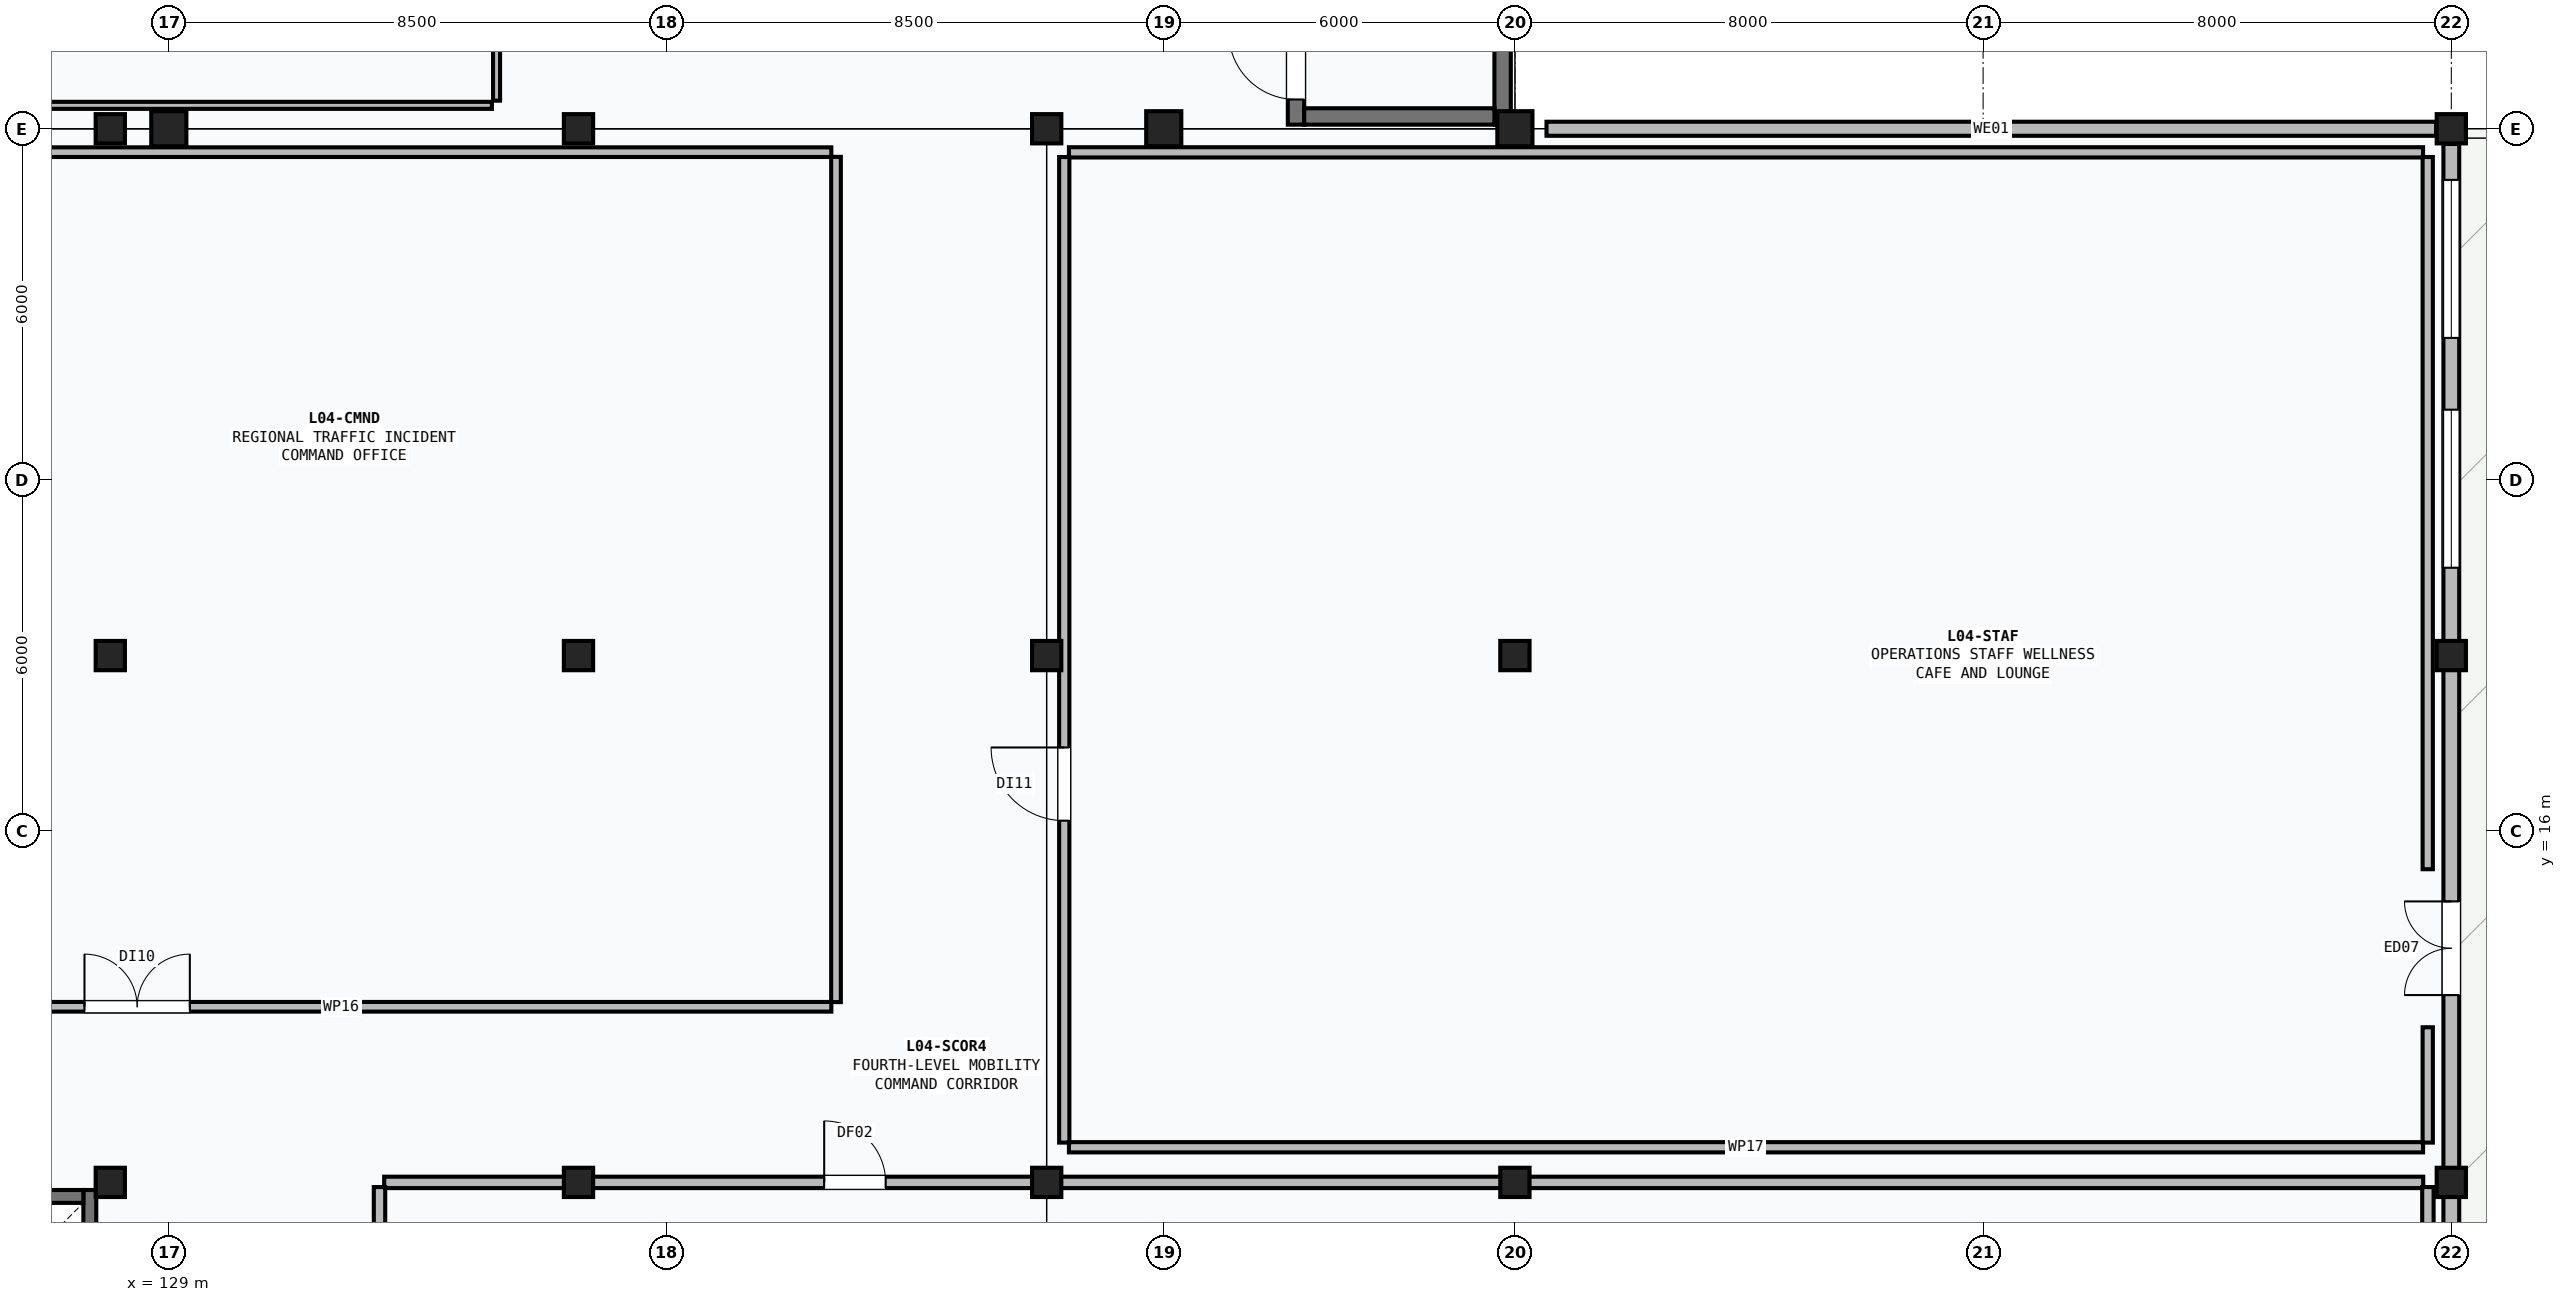
"""IFC4 building model, lengths in metres.
Left out: names, types, materials, properties, quantities, classifications, styles, units other than length and angle.
Written with IfcOpenShell. Run it as: python <this file> out.ifc"""

import sys

from ifc_helpers import new_model, si_unit, direction, frame, frame_2d, origin, origin_2d, place, context, subcontext, project, spatial, rectangle, extrude, element, fill, save


model = new_model("IFC4")
c1 = context("Model", 3, precision=1e-05, world=origin(), true_north=direction((0.0, 1.0)))
c2 = subcontext(c1, "Body", "Model", "MODEL_VIEW")
j1 = project(units=[si_unit("LENGTHUNIT", "METRE"), si_unit("PLANEANGLEUNIT", "RADIAN")], contexts=[c1])
p1 = place(None, origin())
s1 = spatial("IfcSite", under=j1, at=p1, CompositionType="ELEMENT")
p2 = place(p1, origin())
s2 = spatial("IfcBuilding", under=s1, at=p2, CompositionType="ELEMENT")
p3 = place(p2, frame((0.0, 0.0, 15.6)))
s3 = spatial("IfcBuildingStorey", under=s2, at=p3, CompositionType="ELEMENT", Elevation=15.6)
for number, where, z_axis, x_axis in (
    (1, (129.0, 28.0, 0.0), (0.0, 0.0, 1.0), (1.0, 0.0, 0.0)),
    (2, (146.0, 28.0, 0.0), (0.0, 0.0, 1.0), (1.0, 0.0, 0.0)),
    (3, (152.0, 28.0, 0.0), (0.0, 0.0, 1.0), (1.0, 0.0, 0.0)),
):
    element("IfcColumn", number, at=place(p3, frame(where, z_axis=z_axis, x_axis=x_axis)), inside=s3, PredefinedType="COLUMN", context=c2, shape_type="SweptSolid", body=[
        extrude(rectangle(XDim=0.6, YDim=0.6, at=origin_2d()), origin(), (0.0, 0.0, 1.0), 3.6),
    ])
for number, where, z_axis, x_axis in (
    (4, (128.0, 10.0, 0.0), (0.0, 0.0, 1.0), (1.0, 0.0, 0.0)),
    (5, (128.0, 19.0, 0.0), (0.0, 0.0, 1.0), (1.0, 0.0, 0.0)),
    (6, (128.0, 28.0, 0.0), (0.0, 0.0, 1.0), (1.0, 0.0, 0.0)),
    (7, (136.0, 10.0, 0.0), (0.0, 0.0, 1.0), (1.0, 0.0, 0.0)),
    (8, (136.0, 19.0, 0.0), (0.0, 0.0, 1.0), (1.0, 0.0, 0.0)),
    (9, (136.0, 28.0, 0.0), (0.0, 0.0, 1.0), (1.0, 0.0, 0.0)),
    (10, (144.0, 10.0, 0.0), (0.0, 0.0, 1.0), (1.0, 0.0, 0.0)),
    (11, (144.0, 19.0, 0.0), (0.0, 0.0, 1.0), (1.0, 0.0, 0.0)),
    (12, (144.0, 28.0, 0.0), (0.0, 0.0, 1.0), (1.0, 0.0, 0.0)),
    (13, (152.0, 10.0, 0.0), (0.0, 0.0, 1.0), (1.0, 0.0, 0.0)),
    (14, (152.0, 19.0, 0.0), (0.0, 0.0, 1.0), (1.0, 0.0, 0.0)),
    (15, (168.0, 10.0, 0.0), (0.0, 0.0, 1.0), (1.0, 0.0, 0.0)),
    (16, (168.0, 19.0, 0.0), (0.0, 0.0, 1.0), (1.0, 0.0, 0.0)),
    (17, (168.0, 28.0, 0.0), (0.0, 0.0, 1.0), (1.0, 0.0, 0.0)),
):
    element("IfcColumn", number, at=place(p3, frame(where, z_axis=z_axis, x_axis=x_axis)), inside=s3, PredefinedType="COLUMN", context=c2, shape_type="SweptSolid", body=[
        extrude(rectangle(XDim=0.5, YDim=0.5, at=origin_2d()), origin(), (0.0, 0.0, 1.0), 3.6),
    ])
p4 = place(p3, frame((168.0, 0.26, 0.0), z_axis=(0.0, 0.0, 1.0), x_axis=(0.0, 1.0, 0.0)))
e18 = element("IfcWall", 18, at=p4, inside=s3, PredefinedType="SOLIDWALL", context=c2, shape_type="SweptSolid", body=[
    extrude(rectangle(XDim=27.48, YDim=0.27, at=frame_2d((13.74, 0.0))), origin(), (0.0, 0.0, 1.0), 2.495),
])
p5 = place(p4, frame((12.94, 0.0, 0.0)))
e19 = element("IfcOpeningElement", 19, at=p5, cuts=e18, PredefinedType="OPENING", context=c2, shape_type="SweptSolid", body=[
    extrude(rectangle(XDim=1.6, YDim=2.1, at=frame_2d((0.8, 1.05))), frame((0.0, 0.145, 0.0), z_axis=(0.0, -1.0, 0.0), x_axis=(1.0, 0.0, 0.0)), (0.0, 0.0, 1.0), 0.29),
])
p6 = place(p4, frame((0.613, 0.0, 0.495)))
e20 = element("IfcOpeningElement", 20, at=p6, cuts=e18, PredefinedType="OPENING", context=c2, shape_type="SweptSolid", body=[
    extrude(rectangle(XDim=2.7, YDim=1.8, at=frame_2d((1.35, 0.9))), frame((0.0, 0.145, 0.0), z_axis=(0.0, -1.0, 0.0), x_axis=(1.0, 0.0, 0.0)), (0.0, 0.0, 1.0), 0.29),
])
p7 = place(p4, frame((4.539, 0.0, 0.495)))
e21 = element("IfcOpeningElement", 21, at=p7, cuts=e18, PredefinedType="OPENING", context=c2, shape_type="SweptSolid", body=[
    extrude(rectangle(XDim=2.7, YDim=1.8, at=frame_2d((1.35, 0.9))), frame((0.0, 0.145, 0.0), z_axis=(0.0, -1.0, 0.0), x_axis=(1.0, 0.0, 0.0)), (0.0, 0.0, 1.0), 0.29),
])
p8 = place(p4, frame((20.241, 0.0, 0.495)))
e22 = element("IfcOpeningElement", 22, at=p8, cuts=e18, PredefinedType="OPENING", context=c2, shape_type="SweptSolid", body=[
    extrude(rectangle(XDim=2.7, YDim=1.8, at=frame_2d((1.35, 0.9))), frame((0.0, 0.145, 0.0), z_axis=(0.0, -1.0, 0.0), x_axis=(1.0, 0.0, 0.0)), (0.0, 0.0, 1.0), 0.29),
])
p9 = place(p4, frame((24.167, 0.0, 0.495)))
e23 = element("IfcOpeningElement", 23, at=p9, cuts=e18, PredefinedType="OPENING", context=c2, shape_type="SweptSolid", body=[
    extrude(rectangle(XDim=2.7, YDim=1.8, at=frame_2d((1.35, 0.9))), frame((0.0, 0.145, 0.0), z_axis=(0.0, -1.0, 0.0), x_axis=(1.0, 0.0, 0.0)), (0.0, 0.0, 1.0), 0.29),
])
p10 = place(p3, frame((167.74, 28.0, 1.2), z_axis=(0.0, 0.0, 1.0), x_axis=(-1.0, 0.0, 0.0)))
e24 = element("IfcWall", 24, at=p10, inside=s3, PredefinedType="SOLIDWALL", context=c2, shape_type="SweptSolid", body=[
    extrude(rectangle(XDim=15.2, YDim=0.24, at=frame_2d((7.6, 0.0))), origin(), (0.0, 0.0, 1.0), 1.295),
])
p11 = place(p3, frame((148.26, 28.07, 0.0), z_axis=(0.0, 0.0, 1.0), x_axis=(0.0, 1.0, 0.0)))
e25 = element("IfcWall", 25, at=p11, inside=s3, PredefinedType="SHEAR", context=c2, shape_type="SweptSolid", body=[
    extrude(rectangle(XDim=9.86, YDim=0.28, at=frame_2d((4.93, 0.0))), origin(), (0.0, 0.0, 1.0), 3.6),
])
p12 = place(p11, frame((0.43, 0.0, 0.0)))
e26 = element("IfcOpeningElement", 26, at=p12, cuts=e25, PredefinedType="OPENING", context=c2, shape_type="SweptSolid", body=[
    extrude(rectangle(XDim=1.15, YDim=2.15, at=frame_2d((0.575, 1.075))), frame((0.0, 0.15, 0.0), z_axis=(0.0, -1.0, 0.0), x_axis=(1.0, 0.0, 0.0)), (0.0, 0.0, 1.0), 0.3),
])
p13 = place(p3, frame((151.79, 37.93, 0.0), z_axis=(0.0, 0.0, 1.0), x_axis=(0.0, -1.0, 0.0)))
e27 = element("IfcWall", 27, at=p13, inside=s3, PredefinedType="SHEAR", context=c2, shape_type="SweptSolid", body=[
    extrude(rectangle(XDim=9.86, YDim=0.28, at=frame_2d((4.93, 0.0))), origin(), (0.0, 0.0, 1.0), 3.6),
])
p14 = place(p3, frame((151.65, 28.21, 0.0), z_axis=(0.0, 0.0, 1.0), x_axis=(-1.0, 0.0, 0.0)))
e28 = element("IfcWall", 28, at=p14, inside=s3, PredefinedType="SHEAR", context=c2, shape_type="SweptSolid", body=[
    extrude(rectangle(XDim=3.25, YDim=0.28, at=frame_2d((1.625, 0.0))), origin(), (0.0, 0.0, 1.0), 3.6),
])
p15 = place(p3, frame((127.65, 9.87, 0.0), z_axis=(0.0, 0.0, 1.0), x_axis=(0.0, -1.0, 0.0)))
e29 = element("IfcWall", 29, at=p15, inside=s3, PredefinedType="SHEAR", context=c2, shape_type="SweptSolid", body=[
    extrude(rectangle(XDim=3.81, YDim=0.22, at=frame_2d((1.905, 0.0))), origin(), (0.0, 0.0, 1.0), 3.6),
])
p16 = place(p15, frame((1.205, 0.0, 0.0)))
e30 = element("IfcOpeningElement", 30, at=p16, cuts=e29, PredefinedType="OPENING", context=c2, shape_type="SweptSolid", body=[
    extrude(rectangle(XDim=1.4, YDim=2.3, at=frame_2d((0.7, 1.15))), frame((0.0, 0.12, 0.0), z_axis=(0.0, -1.0, 0.0), x_axis=(1.0, 0.0, 0.0)), (0.0, 0.0, 1.0), 0.24),
])
p17 = place(p3, frame((123.94, 9.76, 0.0), z_axis=(0.0, 0.0, 1.0), x_axis=(1.0, 0.0, 0.0)))
e31 = element("IfcWall", 31, at=p17, inside=s3, PredefinedType="SHEAR", context=c2, shape_type="SweptSolid", body=[
    extrude(rectangle(XDim=3.6, YDim=0.22, at=frame_2d((1.8, 0.0))), origin(), (0.0, 0.0, 1.0), 3.6),
])
p18 = place(p3, frame((112.48, 28.4, 0.0), z_axis=(0.0, 0.0, 1.0), x_axis=(1.0, 0.0, 0.0)))
e32 = element("IfcWall", 32, at=p18, inside=s3, PredefinedType="PARTITIONING", context=c2, shape_type="SweptSolid", body=[
    extrude(rectangle(XDim=22.04, YDim=0.12, at=frame_2d((11.02, 0.0))), origin(), (0.0, 0.0, 1.0), 2.495),
])
p19 = place(p3, frame((134.6, 28.48, 0.0), z_axis=(0.0, 0.0, 1.0), x_axis=(0.0, 1.0, 0.0)))
e33 = element("IfcWall", 33, at=p19, inside=s3, PredefinedType="PARTITIONING", context=c2, shape_type="SweptSolid", body=[
    extrude(rectangle(XDim=9.44, YDim=0.12, at=frame_2d((4.72, 0.0))), origin(), (0.0, 0.0, 1.0), 3.345),
])
p20 = place(p19, frame((3.995, 0.0, 0.0)))
e34 = element("IfcOpeningElement", 34, at=p20, cuts=e33, PredefinedType="OPENING", context=c2, shape_type="SweptSolid", body=[
    extrude(rectangle(XDim=1.45, YDim=2.2, at=frame_2d((0.725, 1.1))), frame((0.0, 0.07, 0.0), z_axis=(0.0, -1.0, 0.0), x_axis=(1.0, 0.0, 0.0)), (0.0, 0.0, 1.0), 0.14),
])
p21 = place(p3, frame((112.48, 13.0, 0.0), z_axis=(0.0, 0.0, 1.0), x_axis=(1.0, 0.0, 0.0)))
e35 = element("IfcWall", 35, at=p21, inside=s3, PredefinedType="PARTITIONING", context=c2, shape_type="SweptSolid", body=[
    extrude(rectangle(XDim=27.84, YDim=0.165, at=frame_2d((13.92, 0.0))), origin(), (0.0, 0.0, 1.0), 2.595),
])
p22 = place(p21, frame((15.079, 0.0, 0.0)))
e36 = element("IfcOpeningElement", 36, at=p22, cuts=e35, PredefinedType="OPENING", context=c2, shape_type="SweptSolid", body=[
    extrude(rectangle(XDim=1.8, YDim=2.15, at=frame_2d((0.9, 1.075))), frame((0.0, 0.093, 0.0), z_axis=(0.0, -1.0, 0.0), x_axis=(1.0, 0.0, 0.0)), (0.0, 0.0, 1.0), 0.185),
])
p23 = place(p3, frame((112.48, 27.6, 0.0), z_axis=(0.0, 0.0, 1.0), x_axis=(1.0, 0.0, 0.0)))
e37 = element("IfcWall", 37, at=p23, inside=s3, PredefinedType="PARTITIONING", context=c2, shape_type="SweptSolid", body=[
    extrude(rectangle(XDim=27.84, YDim=0.165, at=frame_2d((13.92, 0.0))), origin(), (0.0, 0.0, 1.0), 2.495),
])
p24 = place(p3, frame((140.4, 13.08, 0.0), z_axis=(0.0, 0.0, 1.0), x_axis=(0.0, 1.0, 0.0)))
e38 = element("IfcWall", 38, at=p24, inside=s3, PredefinedType="PARTITIONING", context=c2, shape_type="SweptSolid", body=[
    extrude(rectangle(XDim=14.44, YDim=0.165, at=frame_2d((7.22, 0.0))), origin(), (0.0, 0.0, 1.0), 2.795),
])
p25 = place(p3, frame((144.38, 10.6, 0.0), z_axis=(0.0, 0.0, 1.0), x_axis=(1.0, 0.0, 0.0)))
e39 = element("IfcWall", 39, at=p25, inside=s3, PredefinedType="PARTITIONING", context=c2, shape_type="SweptSolid", body=[
    extrude(rectangle(XDim=23.137, YDim=0.175, at=frame_2d((11.569, 0.0))), origin(), (0.0, 0.0, 1.0), 2.595),
])
p26 = place(p3, frame((144.38, 27.597, 0.0), z_axis=(0.0, 0.0, 1.0), x_axis=(1.0, 0.0, 0.0)))
e40 = element("IfcWall", 40, at=p26, inside=s3, PredefinedType="PARTITIONING", context=c2, shape_type="SweptSolid", body=[
    extrude(rectangle(XDim=23.137, YDim=0.175, at=frame_2d((11.569, 0.0))), origin(), (0.0, 0.0, 1.0), 2.495),
])
p27 = place(p3, frame((144.3, 10.68, 0.0), z_axis=(0.0, 0.0, 1.0), x_axis=(0.0, 1.0, 0.0)))
e41 = element("IfcWall", 41, at=p27, inside=s3, PredefinedType="PARTITIONING", context=c2, shape_type="SweptSolid", body=[
    extrude(rectangle(XDim=16.837, YDim=0.175, at=frame_2d((8.418, 0.0))), origin(), (0.0, 0.0, 1.0), 2.345),
])
p28 = place(p27, frame((5.5, 0.0, 0.0)))
e42 = element("IfcOpeningElement", 42, at=p28, cuts=e41, PredefinedType="OPENING", context=c2, shape_type="SweptSolid", body=[
    extrude(rectangle(XDim=1.25, YDim=2.1, at=frame_2d((0.625, 1.05))), frame((0.0, 0.098, 0.0), z_axis=(0.0, -1.0, 0.0), x_axis=(1.0, 0.0, 0.0)), (0.0, 0.0, 1.0), 0.195),
])
p29 = place(p3, frame((167.597, 10.68, 0.0), z_axis=(0.0, 0.0, 1.0), x_axis=(0.0, 1.0, 0.0)))
e43 = element("IfcWall", 43, at=p29, inside=s3, PredefinedType="PARTITIONING", context=c2, shape_type="SweptSolid", body=[
    extrude(rectangle(XDim=1.97, YDim=0.175, at=frame_2d((0.985, 0.0))), origin(), (0.0, 0.0, 1.0), 3.345),
])
p30 = place(p3, frame((167.597, 15.35, 0.0), z_axis=(0.0, 0.0, 1.0), x_axis=(0.0, 1.0, 0.0)))
e44 = element("IfcWall", 44, at=p30, inside=s3, PredefinedType="PARTITIONING", context=c2, shape_type="SweptSolid", body=[
    extrude(rectangle(XDim=12.167, YDim=0.175, at=frame_2d((6.083, 0.0))), origin(), (0.0, 0.0, 1.0), 2.495),
])
p31 = place(p3, frame((132.68, 10.0, 0.0), z_axis=(0.0, 0.0, 1.0), x_axis=(1.0, 0.0, 0.0)))
e45 = element("IfcWall", 45, at=p31, inside=s3, PredefinedType="PARTITIONING", context=c2, shape_type="SweptSolid", body=[
    extrude(rectangle(XDim=34.84, YDim=0.195, at=frame_2d((17.42, 0.0))), origin(), (0.0, 0.0, 1.0), 2.345),
])
p32 = place(p31, frame((7.518, 0.0, 0.0)))
e46 = element("IfcOpeningElement", 46, at=p32, cuts=e45, PredefinedType="OPENING", context=c2, shape_type="SweptSolid", body=[
    extrude(rectangle(XDim=1.05, YDim=2.15, at=frame_2d((0.525, 1.075))), frame((0.0, 0.107, 0.0), z_axis=(0.0, -1.0, 0.0), x_axis=(1.0, 0.0, 0.0)), (0.0, 0.0, 1.0), 0.215),
])
p33 = place(p3, frame((132.6, 0.48, 0.0), z_axis=(0.0, 0.0, 1.0), x_axis=(0.0, 1.0, 0.0)))
e47 = element("IfcWall", 47, at=p33, inside=s3, PredefinedType="PARTITIONING", context=c2, shape_type="SweptSolid", body=[
    extrude(rectangle(XDim=9.44, YDim=0.195, at=frame_2d((4.72, 0.0))), origin(), (0.0, 0.0, 1.0), 2.695),
])
p34 = place(p3, frame((167.6, 0.48, 0.0), z_axis=(0.0, 0.0, 1.0), x_axis=(0.0, 1.0, 0.0)))
e48 = element("IfcWall", 48, at=p34, inside=s3, PredefinedType="PARTITIONING", context=c2, shape_type="SweptSolid", body=[
    extrude(rectangle(XDim=9.44, YDim=0.195, at=frame_2d((4.72, 0.0))), origin(), (0.0, 0.0, 1.0), 2.495),
])
p35 = place(p5, origin())
e49 = element("IfcDoor", 49, at=p35, inside=s3, OperationType="DOUBLE_DOOR_SINGLE_SWING", PredefinedType="DOOR", context=c2, shape_type="SweptSolid", body=[
    extrude(rectangle(XDim=1.6, YDim=2.1, at=frame_2d((0.8, 1.05))), frame((0.0, 0.025, 0.0), z_axis=(0.0, -1.0, 0.0), x_axis=(1.0, 0.0, 0.0)), (0.0, 0.0, 1.0), 0.05),
])
fill(e19, e49)
p36 = place(p8, origin())
e50 = element("IfcWindow", 50, at=p36, inside=s3, PartitioningType="SINGLE_PANEL", PredefinedType="WINDOW", context=c2, shape_type="SweptSolid", body=[
    extrude(rectangle(XDim=2.7, YDim=1.8, at=frame_2d((1.35, 0.9))), frame((0.0, 0.03, 0.0), z_axis=(0.0, -1.0, 0.0), x_axis=(1.0, 0.0, 0.0)), (0.0, 0.0, 1.0), 0.06),
])
fill(e22, e50)
p37 = place(p9, origin())
e51 = element("IfcWindow", 51, at=p37, inside=s3, PartitioningType="SINGLE_PANEL", PredefinedType="WINDOW", context=c2, shape_type="SweptSolid", body=[
    extrude(rectangle(XDim=2.7, YDim=1.8, at=frame_2d((1.35, 0.9))), frame((0.0, 0.03, 0.0), z_axis=(0.0, -1.0, 0.0), x_axis=(1.0, 0.0, 0.0)), (0.0, 0.0, 1.0), 0.06),
])
fill(e23, e51)
p38 = place(p12, origin())
e52 = element("IfcDoor", 52, at=p38, inside=s3, OperationType="SINGLE_SWING_RIGHT", PredefinedType="DOOR", context=c2, shape_type="SweptSolid", body=[
    extrude(rectangle(XDim=1.15, YDim=2.15, at=frame_2d((0.575, 1.075))), frame((0.0, 0.025, 0.0), z_axis=(0.0, -1.0, 0.0), x_axis=(1.0, 0.0, 0.0)), (0.0, 0.0, 1.0), 0.05),
])
fill(e26, e52)
p39 = place(p22, origin())
e53 = element("IfcDoor", 53, at=p39, inside=s3, OperationType="DOUBLE_DOOR_SINGLE_SWING", PredefinedType="DOOR", context=c2, shape_type="SweptSolid", body=[
    extrude(rectangle(XDim=1.8, YDim=2.15, at=frame_2d((0.9, 1.075))), frame((0.0, 0.025, 0.0), z_axis=(0.0, -1.0, 0.0), x_axis=(1.0, 0.0, 0.0)), (0.0, 0.0, 1.0), 0.05),
])
fill(e36, e53)
p40 = place(p28, origin())
e54 = element("IfcDoor", 54, at=p40, inside=s3, OperationType="SINGLE_SWING_RIGHT", PredefinedType="DOOR", context=c2, shape_type="SweptSolid", body=[
    extrude(rectangle(XDim=1.25, YDim=2.1, at=frame_2d((0.625, 1.05))), frame((0.0, 0.025, 0.0), z_axis=(0.0, -1.0, 0.0), x_axis=(1.0, 0.0, 0.0)), (0.0, 0.0, 1.0), 0.05),
])
fill(e42, e54)
p41 = place(p32, origin())
e55 = element("IfcDoor", 55, at=p41, inside=s3, OperationType="SINGLE_SWING_LEFT", PredefinedType="DOOR", context=c2, shape_type="SweptSolid", body=[
    extrude(rectangle(XDim=1.05, YDim=2.15, at=frame_2d((0.525, 1.075))), frame((0.0, 0.025, 0.0), z_axis=(0.0, -1.0, 0.0), x_axis=(1.0, 0.0, 0.0)), (0.0, 0.0, 1.0), 0.05),
])
fill(e46, e55)
save(model, sys.argv[1])
